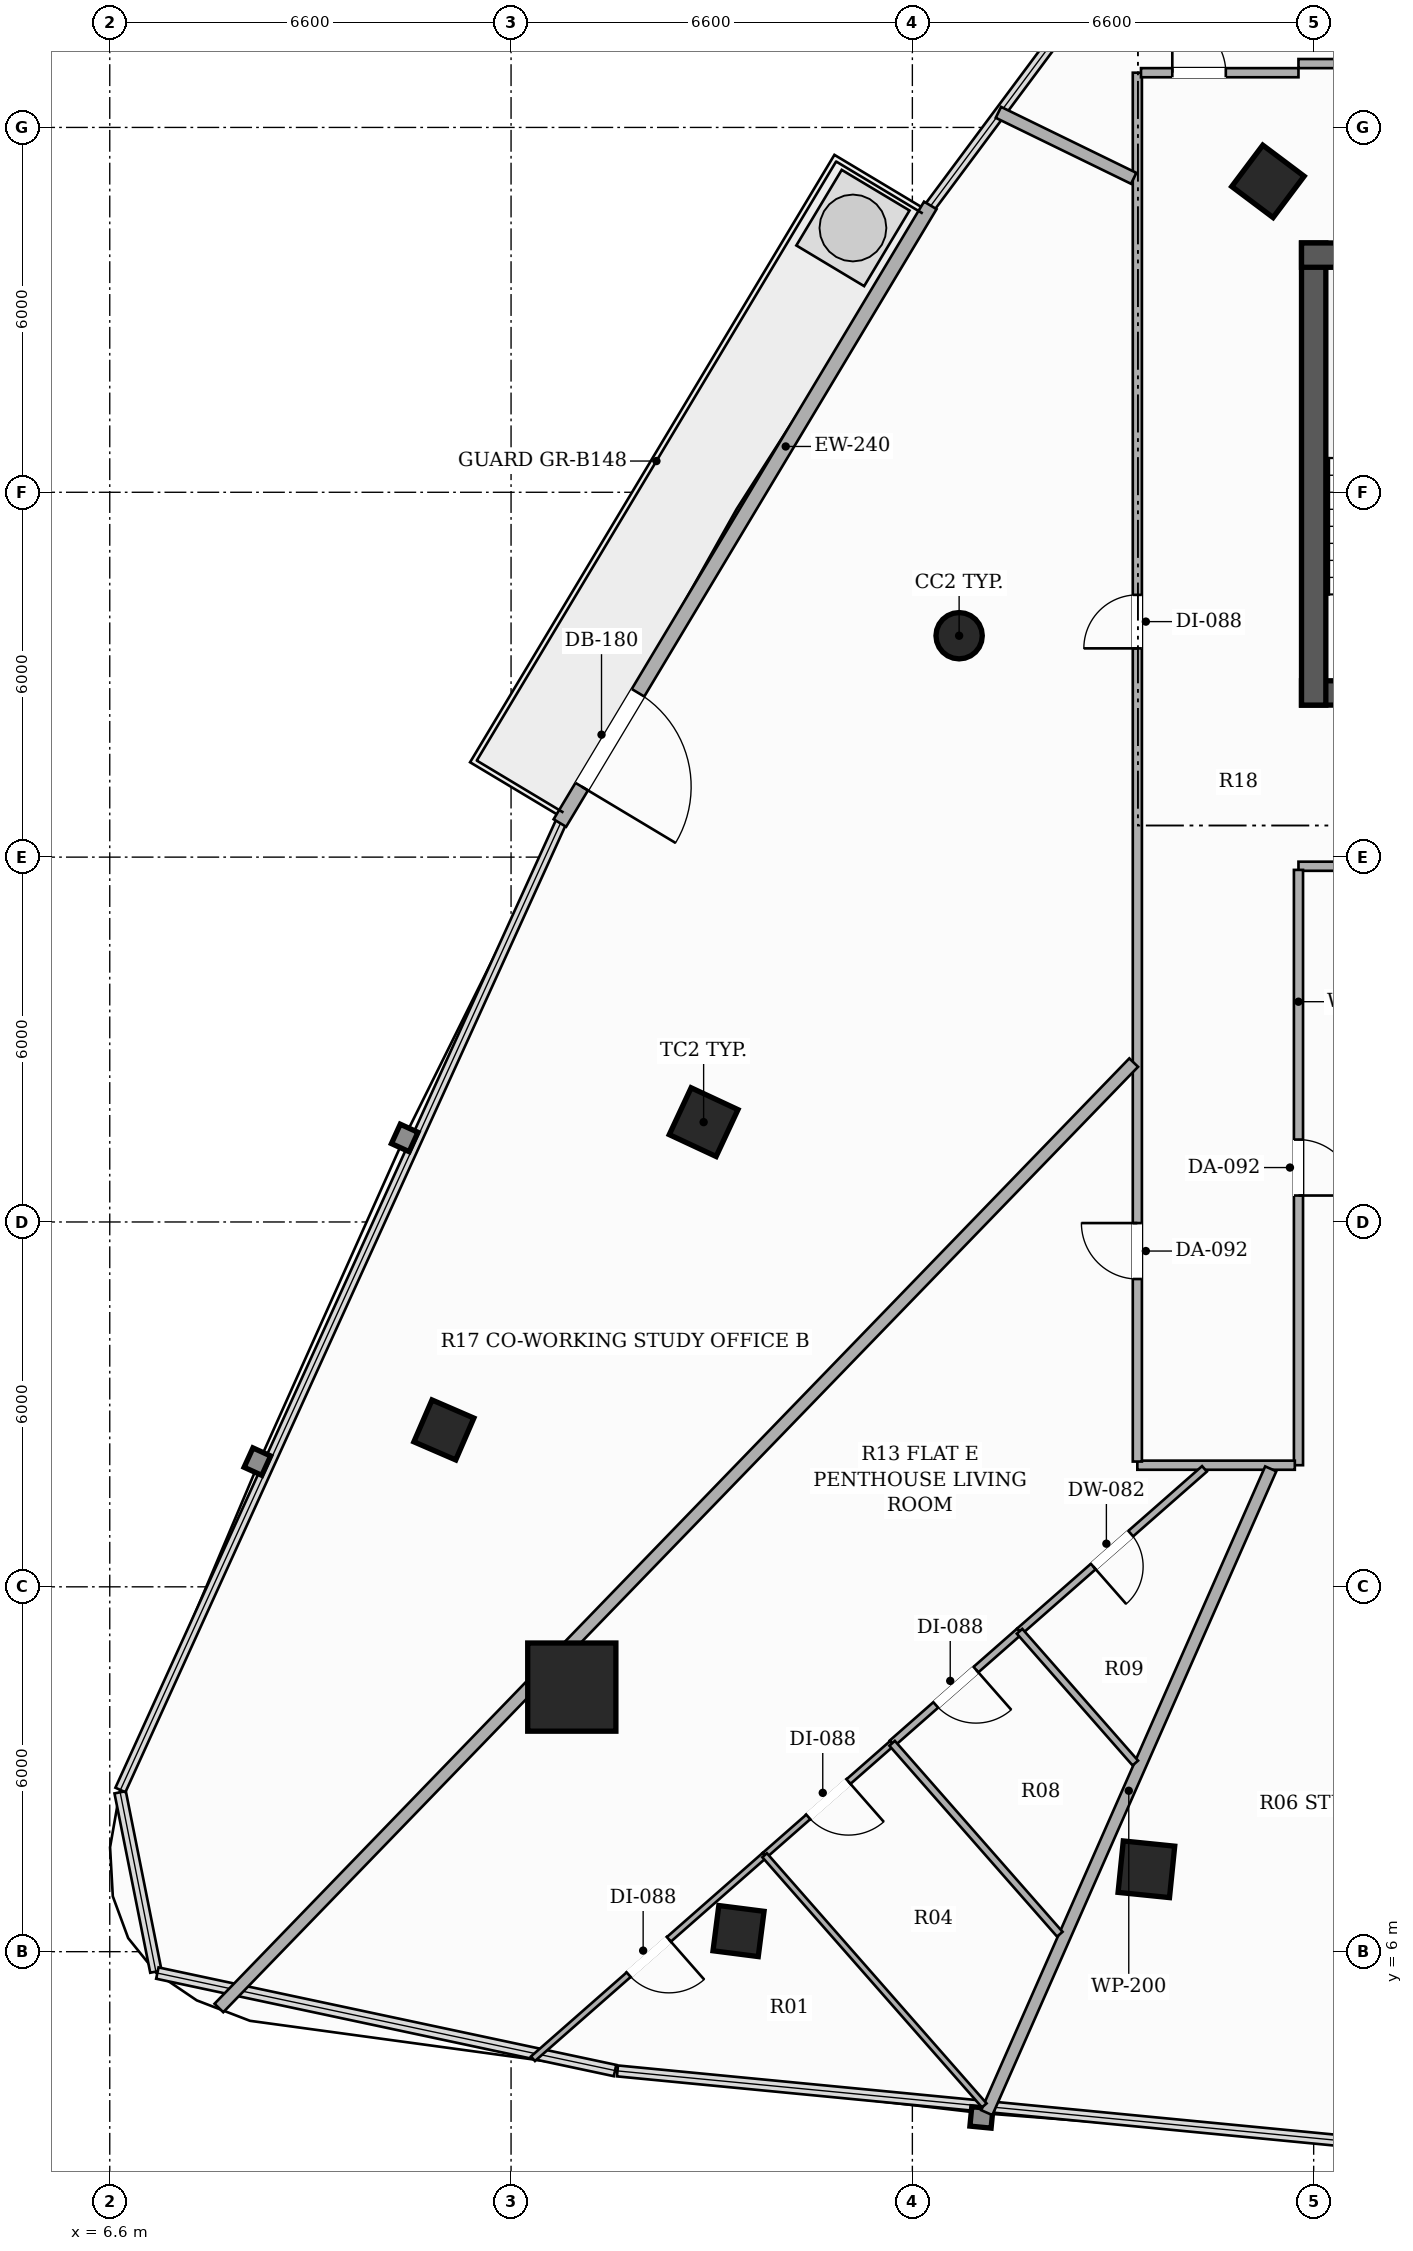
"""IFC4 building model, lengths in metres.
Left out: names, types, materials, properties, quantities, classifications, styles, units other than length and angle.
Written with IfcOpenShell. Run it as: python <this file> out.ifc"""

import sys

from ifc_helpers import new_model, si_unit, direction, frame, frame_2d, origin, origin_2d, place, context, subcontext, project, spatial, rectangle, hollow_rectangle, hollow_circle, extrude, element, fill, save


model = new_model("IFC4")
c1 = context("Model", 3, precision=1e-05, world=origin(), true_north=direction((0.0, 1.0)))
c2 = subcontext(c1, "Body", "Model", "MODEL_VIEW")
j1 = project(units=[si_unit("LENGTHUNIT", "METRE"), si_unit("PLANEANGLEUNIT", "RADIAN")], contexts=[c1])
p1 = place(None, origin())
s1 = spatial("IfcSite", under=j1, at=p1, CompositionType="ELEMENT")
p2 = place(p1, origin())
s2 = spatial("IfcBuilding", under=s1, at=p2, CompositionType="ELEMENT")
p3 = place(p2, frame((0.0, 0.0, 106.7)))
s3 = spatial("IfcBuildingStorey", under=s2, at=p3, CompositionType="ELEMENT", Elevation=106.7)
p4 = place(p3, frame((26.2, 26.7, 0.0), z_axis=(0.0, 0.0, 1.0), x_axis=(1.0, 0.0, 0.0)))
e1 = element("IfcWall", 1, at=p4, inside=s3, PredefinedType="SHEAR", context=c2, shape_type="SweptSolid", body=[
    extrude(rectangle(XDim=13.6, YDim=0.4, at=frame_2d((6.8, 0.0))), origin(), (0.0, 0.0, 1.0), 3.3),
])
p5 = place(p4, frame((4.35, 0.0, 0.0)))
e2 = element("IfcOpeningElement", 2, at=p5, cuts=e1, PredefinedType="OPENING", context=c2, shape_type="SweptSolid", body=[
    extrude(rectangle(XDim=1.05, YDim=2.15, at=frame_2d((0.525, 1.075))), frame((0.0, 0.21, 0.0), z_axis=(0.0, -1.0, 0.0), x_axis=(1.0, 0.0, 0.0)), (0.0, 0.0, 1.0), 0.42),
])
p6 = place(p4, frame((8.3, 0.0, 0.0)))
e3 = element("IfcOpeningElement", 3, at=p6, cuts=e1, PredefinedType="OPENING", context=c2, shape_type="SweptSolid", body=[
    extrude(rectangle(XDim=1.05, YDim=2.15, at=frame_2d((0.525, 1.075))), frame((0.0, 0.21, 0.0), z_axis=(0.0, -1.0, 0.0), x_axis=(1.0, 0.0, 0.0)), (0.0, 0.0, 1.0), 0.42),
])
p7 = place(p3, frame((26.4, 26.5, 0.0), z_axis=(0.0, 0.0, 1.0), x_axis=(0.0, 1.0, 0.0)))
e4 = element("IfcWall", 4, at=p7, inside=s3, PredefinedType="SHEAR", context=c2, shape_type="SweptSolid", body=[
    extrude(rectangle(XDim=7.6, YDim=0.4, at=frame_2d((3.8, 0.0))), origin(), (0.0, 0.0, 1.0), 3.3),
])
p8 = place(p3, frame((26.2, 33.9, 0.0), z_axis=(0.0, 0.0, 1.0), x_axis=(1.0, 0.0, 0.0)))
e5 = element("IfcWall", 5, at=p8, inside=s3, PredefinedType="SHEAR", context=c2, shape_type="SweptSolid", body=[
    extrude(rectangle(XDim=3.68, YDim=0.4, at=frame_2d((1.84, 0.0))), origin(), (0.0, 0.0, 1.0), 3.3),
])
p9 = place(p3, frame((14.199, 10.351, 0.0), z_axis=(0.0, 0.0, 1.0), x_axis=(1.0, 0.0, 0.0)))
e6 = element("IfcColumn", 6, at=p9, inside=s3, PredefinedType="COLUMN", context=c2, shape_type="SweptSolid", body=[
    extrude(hollow_rectangle(XDim=1.45, YDim=1.45, WallThickness=0.045, at=origin_2d()), origin(), (0.0, 0.0, 1.0), 3.3),
])
p10 = place(p3, frame((25.648, 35.113, 0.0), z_axis=(0.0, 0.0, 1.0), x_axis=(0.600420225326, 0.799684658487, 0.0)))
e7 = element("IfcColumn", 7, at=p10, inside=s3, PredefinedType="COLUMN", context=c2, shape_type="SweptSolid", body=[
    extrude(hollow_rectangle(XDim=0.85, YDim=0.85, WallThickness=0.028, at=origin_2d()), origin(), (0.0, 0.0, 1.0), 3.3),
])
p11 = place(p3, frame((20.569, 27.641, 0.0), z_axis=(0.0, 0.0, 1.0), x_axis=(1.0, 0.0, 0.0)))
e8 = element("IfcColumn", 8, at=p11, inside=s3, PredefinedType="COLUMN", context=c2, shape_type="SweptSolid", body=[
    extrude(hollow_circle(Radius=0.381, WallThickness=0.022, at=origin_2d()), origin(), (0.0, 0.0, 1.0), 3.3),
])
for number, where, z_axis, x_axis in (
    (9, (16.367, 19.642, 0.0), (0.0, 0.0, 1.0), (0.423, 0.906, 0.0)),
    (10, (23.649, 7.355, 0.0), (0.0, 0.0, 1.0), (-0.995, 0.101, 0.0)),
):
    element("IfcColumn", number, at=place(p3, frame(where, z_axis=z_axis, x_axis=x_axis)), inside=s3, PredefinedType="COLUMN", context=c2, shape_type="SweptSolid", body=[
        extrude(hollow_rectangle(XDim=0.85, YDim=0.85, WallThickness=0.028, at=origin_2d()), origin(), (0.0, 0.0, 1.0), 3.3),
    ])
for number, where, z_axis, x_axis in (
    (11, (12.095, 14.58, 0.0), (0.0, 0.0, 1.0), (0.397, 0.918, 0.0)),
    (12, (16.941, 6.339, 0.0), (0.0, 0.0, 1.0), (-0.992, 0.127, 0.0)),
):
    element("IfcColumn", number, at=place(p3, frame(where, z_axis=z_axis, x_axis=x_axis)), inside=s3, PredefinedType="COLUMN", context=c2, shape_type="SweptSolid", body=[
        extrude(hollow_rectangle(XDim=0.75, YDim=0.75, WallThickness=0.025, at=origin_2d()), origin(), (0.0, 0.0, 1.0), 3.3),
    ])
p12 = place(p3, frame((20.095, 34.718, 0.0), z_axis=(0.0, 0.0, 1.0), x_axis=(-0.514362369366, -0.857572943242, 0.0)))
e13 = element("IfcWall", 13, at=p12, inside=s3, PredefinedType="SOLIDWALL", context=c2, shape_type="SweptSolid", body=[
    extrude(rectangle(XDim=11.844, YDim=0.24, at=frame_2d((5.922, 0.0))), origin(), (0.0, 0.0, 1.0), 2.624),
])
p13 = place(p12, frame((9.346, 0.0, 0.0)))
e14 = element("IfcOpeningElement", 14, at=p13, cuts=e13, PredefinedType="OPENING", context=c2, shape_type="SweptSolid", body=[
    extrude(rectangle(XDim=1.8, YDim=2.2, at=frame_2d((0.9, 1.1))), frame((0.0, 0.13, 0.0), z_axis=(0.0, -1.0, 0.0), x_axis=(1.0, 0.0, 0.0)), (0.0, 0.0, 1.0), 0.26),
])
p14 = place(p3, frame((31.775, 23.85, 0.0), z_axis=(0.0, 0.0, 1.0), x_axis=(-1.0, 0.0, 0.0)))
e15 = element("IfcWall", 15, at=p14, inside=s3, PredefinedType="PARTITIONING", context=c2, shape_type="SweptSolid", body=[
    extrude(rectangle(XDim=5.625, YDim=0.15, at=frame_2d((2.812, 0.0))), origin(), (0.0, 0.0, 1.0), 2.721),
])
p15 = place(p3, frame((26.15, 23.79, 0.0), z_axis=(0.0, 0.0, 1.0), x_axis=(0.0, -1.0, 0.0)))
e16 = element("IfcWall", 16, at=p15, inside=s3, PredefinedType="PARTITIONING", context=c2, shape_type="SweptSolid", body=[
    extrude(rectangle(XDim=9.79, YDim=0.15, at=frame_2d((4.895, 0.0))), origin(), (0.0, 0.0, 1.0), 2.721),
])
p16 = place(p15, frame((4.435, 0.0, 0.0)))
e17 = element("IfcOpeningElement", 17, at=p16, cuts=e16, PredefinedType="OPENING", context=c2, shape_type="SweptSolid", body=[
    extrude(rectangle(XDim=0.92, YDim=2.15, at=frame_2d((0.46, 1.075))), frame((0.0, 0.085, 0.0), z_axis=(0.0, -1.0, 0.0), x_axis=(1.0, 0.0, 0.0)), (0.0, 0.0, 1.0), 0.17),
])
p17 = place(p3, frame((26.09, 14.0, 0.0), z_axis=(0.0, 0.0, 1.0), x_axis=(-1.0, 0.0, 0.0)))
e18 = element("IfcWall", 18, at=p17, inside=s3, PredefinedType="PARTITIONING", context=c2, shape_type="SweptSolid", body=[
    extrude(rectangle(XDim=2.59, YDim=0.15, at=frame_2d((1.295, 0.0))), origin(), (0.0, 0.0, 1.0), 2.721),
])
p18 = place(p3, frame((23.5, 14.06, 0.0), z_axis=(0.0, 0.0, 1.0), x_axis=(0.0, 1.0, 0.0)))
e19 = element("IfcWall", 19, at=p18, inside=s3, PredefinedType="PARTITIONING", context=c2, shape_type="SweptSolid", body=[
    extrude(rectangle(XDim=22.84, YDim=0.15, at=frame_2d((11.42, 0.0))), origin(), (0.0, 0.0, 1.0), 2.413),
])
p19 = place(p18, frame((13.373, 0.0, 0.0)))
e20 = element("IfcOpeningElement", 20, at=p19, cuts=e19, PredefinedType="OPENING", context=c2, shape_type="SweptSolid", body=[
    extrude(rectangle(XDim=0.88, YDim=2.1, at=frame_2d((0.44, 1.05))), frame((0.0, 0.085, 0.0), z_axis=(0.0, -1.0, 0.0), x_axis=(1.0, 0.0, 0.0)), (0.0, 0.0, 1.0), 0.17),
])
p20 = place(p18, frame((3.002, 0.0, 0.0)))
e21 = element("IfcOpeningElement", 21, at=p20, cuts=e19, PredefinedType="OPENING", context=c2, shape_type="SweptSolid", body=[
    extrude(rectangle(XDim=0.92, YDim=2.15, at=frame_2d((0.46, 1.075))), frame((0.0, 0.085, 0.0), z_axis=(0.0, -1.0, 0.0), x_axis=(1.0, 0.0, 0.0)), (0.0, 0.0, 1.0), 0.17),
])
p21 = place(p3, frame((23.56, 36.9, 0.0), z_axis=(0.0, 0.0, 1.0), x_axis=(1.0, 0.0, 0.0)))
e22 = element("IfcWall", 22, at=p21, inside=s3, PredefinedType="PARTITIONING", context=c2, shape_type="SweptSolid", body=[
    extrude(rectangle(XDim=2.59, YDim=0.15, at=frame_2d((1.295, 0.0))), origin(), (0.0, 0.0, 1.0), 2.413),
])
p22 = place(p21, frame((0.515, 0.0, 0.0)))
e23 = element("IfcOpeningElement", 23, at=p22, cuts=e22, PredefinedType="OPENING", context=c2, shape_type="SweptSolid", body=[
    extrude(rectangle(XDim=0.88, YDim=2.1, at=frame_2d((0.44, 1.05))), frame((0.0, 0.085, 0.0), z_axis=(0.0, -1.0, 0.0), x_axis=(1.0, 0.0, 0.0)), (0.0, 0.0, 1.0), 0.17),
])
p23 = place(p3, frame((26.15, 37.05, 0.0), z_axis=(0.0, 0.0, 1.0), x_axis=(1.0, 0.0, 0.0)))
e24 = element("IfcWall", 24, at=p23, inside=s3, PredefinedType="PARTITIONING", context=c2, shape_type="SweptSolid", body=[
    extrude(rectangle(XDim=2.0, YDim=0.15, at=frame_2d((1.0, 0.0))), origin(), (0.0, 0.0, 1.0), 2.413),
])
p24 = place(p3, frame((21.024, 3.353, 0.0), z_axis=(0.0, 0.0, 1.0), x_axis=(0.403601766718, 0.914934759369, 0.0)))
e25 = element("IfcWall", 25, at=p24, inside=s3, PredefinedType="PARTITIONING", context=c2, shape_type="SweptSolid", body=[
    extrude(rectangle(XDim=11.571, YDim=0.2, at=frame_2d((5.786, 0.0))), origin(), (0.0, 0.0, 1.0), 2.413),
])
p25 = place(p3, frame((23.44, 20.621, 0.0), z_axis=(0.0, 0.0, 1.0), x_axis=(-0.695405261367, -0.718617786075, 0.0)))
e26 = element("IfcWall", 26, at=p25, inside=s3, PredefinedType="PARTITIONING", context=c2, shape_type="SweptSolid", body=[
    extrude(rectangle(XDim=21.635, YDim=0.2, at=frame_2d((10.817, 0.0))), origin(), (0.0, 0.0, 1.0), 2.413),
])
p26 = place(p3, frame((21.215, 36.248, 0.0), z_axis=(0.0, 0.0, 1.0), x_axis=(0.898821522371, -0.438314808012, 0.0)))
e27 = element("IfcWall", 27, at=p26, inside=s3, PredefinedType="PARTITIONING", context=c2, shape_type="SweptSolid", body=[
    extrude(rectangle(XDim=2.475, YDim=0.2, at=frame_2d((1.238, 0.0))), origin(), (0.0, 0.0, 1.0), 3.06),
])
p27 = place(p3, frame((24.604, 13.94, 0.0), z_axis=(0.0, 0.0, 1.0), x_axis=(-0.751349767919, -0.659904179595, 0.0)))
e28 = element("IfcWall", 28, at=p27, inside=s3, PredefinedType="PARTITIONING", context=c2, shape_type="SweptSolid", body=[
    extrude(rectangle(XDim=4.047, YDim=0.12, at=frame_2d((2.024, 0.0))), origin(), (0.0, 0.0, 1.0), 2.721),
])
p28 = place(p27, frame((1.614, 0.0, 0.0)))
e29 = element("IfcOpeningElement", 29, at=p28, cuts=e28, PredefinedType="OPENING", context=c2, shape_type="SweptSolid", body=[
    extrude(rectangle(XDim=0.82, YDim=2.1, at=frame_2d((0.41, 1.05))), frame((0.0, 0.07, 0.0), z_axis=(0.0, -1.0, 0.0), x_axis=(1.0, 0.0, 0.0)), (0.0, 0.0, 1.0), 0.14),
])
p29 = place(p3, frame((21.563, 11.269, 0.0), z_axis=(0.0, 0.0, 1.0), x_axis=(-0.751138604229, -0.660144527537, 0.0)))
e30 = element("IfcWall", 30, at=p29, inside=s3, PredefinedType="PARTITIONING", context=c2, shape_type="SweptSolid", body=[
    extrude(rectangle(XDim=2.79, YDim=0.12, at=frame_2d((1.395, 0.0))), origin(), (0.0, 0.0, 1.0), 2.721),
])
p30 = place(p29, frame((0.955, 0.0, 0.0)))
e31 = element("IfcOpeningElement", 31, at=p30, cuts=e30, PredefinedType="OPENING", context=c2, shape_type="SweptSolid", body=[
    extrude(rectangle(XDim=0.88, YDim=2.1, at=frame_2d((0.44, 1.05))), frame((0.0, 0.07, 0.0), z_axis=(0.0, -1.0, 0.0), x_axis=(1.0, 0.0, 0.0)), (0.0, 0.0, 1.0), 0.14),
])
p31 = place(p3, frame((17.37, 7.586, 0.0), z_axis=(0.0, 0.0, 1.0), x_axis=(-0.751292920188, -0.659968899324, 0.0)))
e32 = element("IfcWall", 32, at=p31, inside=s3, PredefinedType="PARTITIONING", context=c2, shape_type="SweptSolid", body=[
    extrude(rectangle(XDim=5.071, YDim=0.1, at=frame_2d((2.536, 0.0))), origin(), (0.0, 0.0, 1.0), 2.413),
])
p32 = place(p31, frame((2.096, 0.0, 0.0)))
e33 = element("IfcOpeningElement", 33, at=p32, cuts=e32, PredefinedType="OPENING", context=c2, shape_type="SweptSolid", body=[
    extrude(rectangle(XDim=0.88, YDim=2.1, at=frame_2d((0.44, 1.05))), frame((0.0, 0.06, 0.0), z_axis=(0.0, -1.0, 0.0), x_axis=(1.0, 0.0, 0.0)), (0.0, 0.0, 1.0), 0.12),
])
p33 = place(p3, frame((19.467, 9.427, 0.0), z_axis=(0.0, 0.0, 1.0), x_axis=(-0.751464558758, -0.659773458795, 0.0)))
e34 = element("IfcWall", 34, at=p33, inside=s3, PredefinedType="PARTITIONING", context=c2, shape_type="SweptSolid", body=[
    extrude(rectangle(XDim=2.791, YDim=0.1, at=frame_2d((1.395, 0.0))), origin(), (0.0, 0.0, 1.0), 2.721),
])
p34 = place(p33, frame((0.955, 0.0, 0.0)))
e35 = element("IfcOpeningElement", 35, at=p34, cuts=e34, PredefinedType="OPENING", context=c2, shape_type="SweptSolid", body=[
    extrude(rectangle(XDim=0.88, YDim=2.1, at=frame_2d((0.44, 1.05))), frame((0.0, 0.06, 0.0), z_axis=(0.0, -1.0, 0.0), x_axis=(1.0, 0.0, 0.0)), (0.0, 0.0, 1.0), 0.12),
])
p35 = place(p3, frame((23.467, 9.102, 0.0), z_axis=(0.0, 0.0, 1.0), x_axis=(-0.660061062947, 0.751211949573, 0.0)))
e36 = element("IfcWall", 36, at=p35, inside=s3, PredefinedType="PARTITIONING", context=c2, shape_type="SweptSolid", body=[
    extrude(rectangle(XDim=2.885, YDim=0.12, at=frame_2d((1.442, 0.0))), origin(), (0.0, 0.0, 1.0), 2.721),
])
p36 = place(p3, frame((22.225, 6.287, 0.0), z_axis=(0.0, 0.0, 1.0), x_axis=(-0.659946783628, 0.751312347016, 0.0)))
e37 = element("IfcWall", 37, at=p36, inside=s3, PredefinedType="PARTITIONING", context=c2, shape_type="SweptSolid", body=[
    extrude(rectangle(XDim=4.179, YDim=0.12, at=frame_2d((2.09, 0.0))), origin(), (0.0, 0.0, 1.0), 2.413),
])
p37 = place(p3, frame((17.37, 7.586, 0.0), z_axis=(0.0, 0.0, 1.0), x_axis=(0.659851528992, -0.751396007234, 0.0)))
e38 = element("IfcWall", 38, at=p37, inside=s3, PredefinedType="PARTITIONING", context=c2, shape_type="SweptSolid", body=[
    extrude(rectangle(XDim=5.475, YDim=0.1, at=frame_2d((2.738, 0.0))), origin(), (0.0, 0.0, 1.0), 2.413),
])
p38 = place(p13, origin())
e39 = element("IfcDoor", 39, at=p38, inside=s3, OperationType="SINGLE_SWING_RIGHT", PredefinedType="DOOR", context=c2, shape_type="SweptSolid", body=[
    extrude(rectangle(XDim=1.8, YDim=2.2, at=frame_2d((0.9, 1.1))), frame((0.0, 0.025, 0.0), z_axis=(0.0, -1.0, 0.0), x_axis=(1.0, 0.0, 0.0)), (0.0, 0.0, 1.0), 0.05),
])
fill(e14, e39)
p39 = place(p16, origin())
e40 = element("IfcDoor", 40, at=p39, inside=s3, OperationType="SINGLE_SWING_RIGHT", PredefinedType="DOOR", context=c2, shape_type="SweptSolid", body=[
    extrude(rectangle(XDim=0.92, YDim=2.15, at=frame_2d((0.46, 1.075))), frame((0.0, 0.025, 0.0), z_axis=(0.0, -1.0, 0.0), x_axis=(1.0, 0.0, 0.0)), (0.0, 0.0, 1.0), 0.05),
])
fill(e17, e40)
p40 = place(p19, origin())
e41 = element("IfcDoor", 41, at=p40, inside=s3, OperationType="SINGLE_SWING_LEFT", PredefinedType="DOOR", context=c2, shape_type="SweptSolid", body=[
    extrude(rectangle(XDim=0.88, YDim=2.1, at=frame_2d((0.44, 1.05))), frame((0.0, 0.025, 0.0), z_axis=(0.0, -1.0, 0.0), x_axis=(1.0, 0.0, 0.0)), (0.0, 0.0, 1.0), 0.05),
])
fill(e20, e41)
p41 = place(p20, origin())
e42 = element("IfcDoor", 42, at=p41, inside=s3, OperationType="SINGLE_SWING_RIGHT", PredefinedType="DOOR", context=c2, shape_type="SweptSolid", body=[
    extrude(rectangle(XDim=0.92, YDim=2.15, at=frame_2d((0.46, 1.075))), frame((0.0, 0.025, 0.0), z_axis=(0.0, -1.0, 0.0), x_axis=(1.0, 0.0, 0.0)), (0.0, 0.0, 1.0), 0.05),
])
fill(e21, e42)
p42 = place(p28, origin())
e43 = element("IfcDoor", 43, at=p42, inside=s3, OperationType="SINGLE_SWING_RIGHT", PredefinedType="DOOR", context=c2, shape_type="SweptSolid", body=[
    extrude(rectangle(XDim=0.82, YDim=2.1, at=frame_2d((0.41, 1.05))), frame((0.0, 0.025, 0.0), z_axis=(0.0, -1.0, 0.0), x_axis=(1.0, 0.0, 0.0)), (0.0, 0.0, 1.0), 0.05),
])
fill(e29, e43)
p43 = place(p30, origin())
e44 = element("IfcDoor", 44, at=p43, inside=s3, OperationType="SINGLE_SWING_LEFT", PredefinedType="DOOR", context=c2, shape_type="SweptSolid", body=[
    extrude(rectangle(XDim=0.88, YDim=2.1, at=frame_2d((0.44, 1.05))), frame((0.0, 0.025, 0.0), z_axis=(0.0, -1.0, 0.0), x_axis=(1.0, 0.0, 0.0)), (0.0, 0.0, 1.0), 0.05),
])
fill(e31, e44)
p44 = place(p32, origin())
e45 = element("IfcDoor", 45, at=p44, inside=s3, OperationType="SINGLE_SWING_LEFT", PredefinedType="DOOR", context=c2, shape_type="SweptSolid", body=[
    extrude(rectangle(XDim=0.88, YDim=2.1, at=frame_2d((0.44, 1.05))), frame((0.0, 0.025, 0.0), z_axis=(0.0, -1.0, 0.0), x_axis=(1.0, 0.0, 0.0)), (0.0, 0.0, 1.0), 0.05),
])
fill(e33, e45)
p45 = place(p34, origin())
e46 = element("IfcDoor", 46, at=p45, inside=s3, OperationType="SINGLE_SWING_LEFT", PredefinedType="DOOR", context=c2, shape_type="SweptSolid", body=[
    extrude(rectangle(XDim=0.88, YDim=2.1, at=frame_2d((0.44, 1.05))), frame((0.0, 0.025, 0.0), z_axis=(0.0, -1.0, 0.0), x_axis=(1.0, 0.0, 0.0)), (0.0, 0.0, 1.0), 0.05),
])
fill(e35, e46)
p46 = place(p22, origin())
e47 = element("IfcDoor", 47, at=p46, inside=s3, OperationType="SINGLE_SWING_LEFT", PredefinedType="DOOR", context=c2, shape_type="SweptSolid", body=[
    extrude(rectangle(XDim=0.88, YDim=2.1, at=frame_2d((0.44, 1.05))), frame((0.0, 0.025, 0.0), z_axis=(0.0, -1.0, 0.0), x_axis=(1.0, 0.0, 0.0)), (0.0, 0.0, 1.0), 0.05),
])
fill(e23, e47)
save(model, sys.argv[1])
